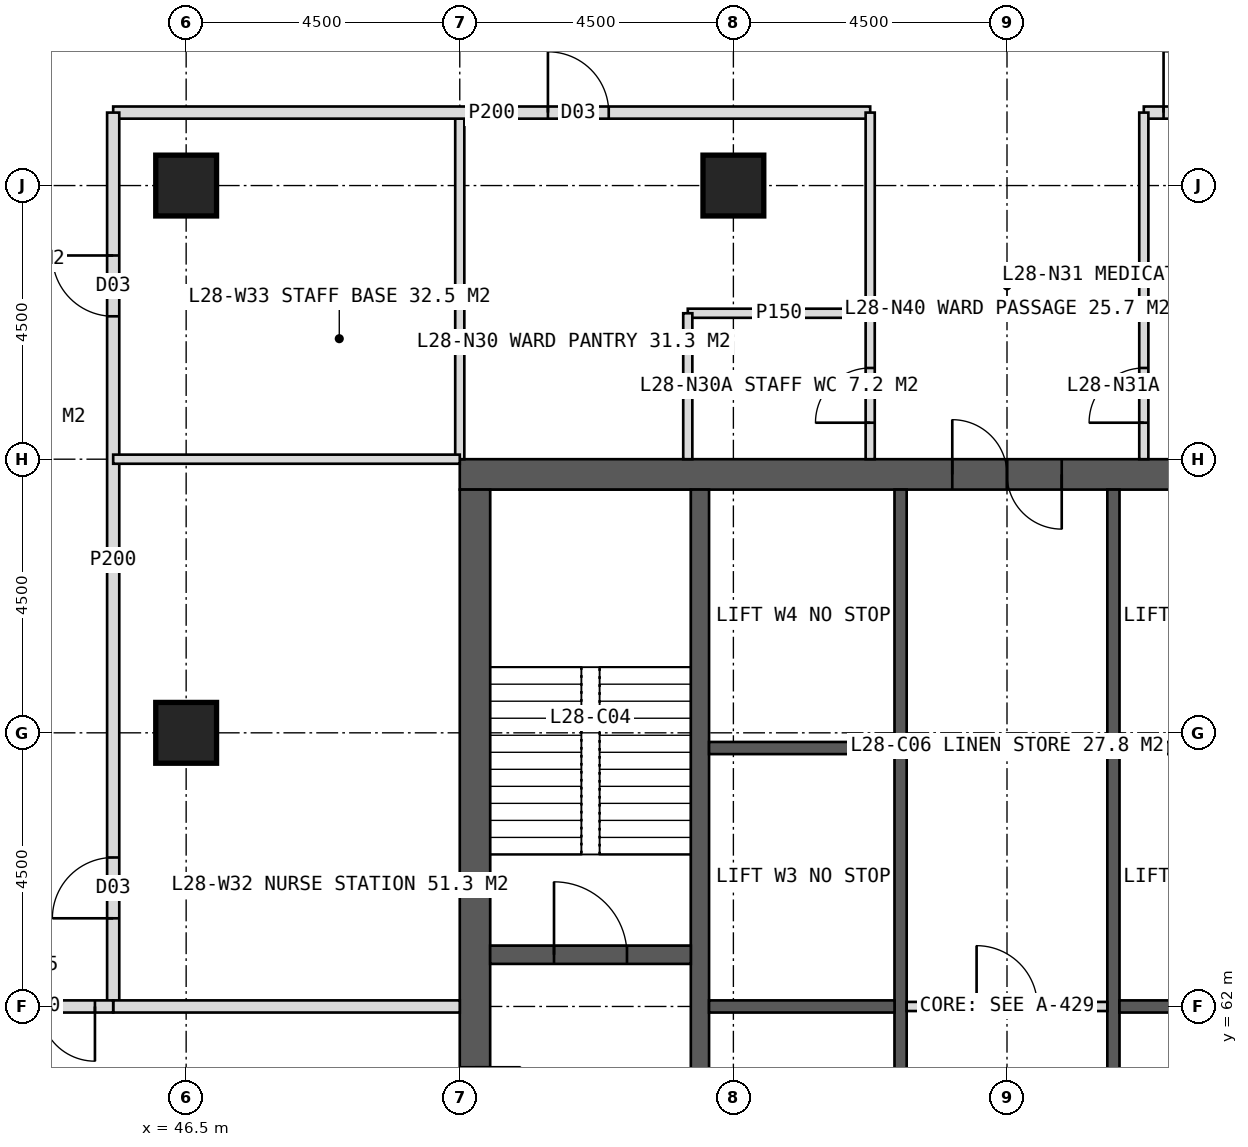
"""IFC4 building model, lengths in metres.
Left out: names, types, materials, properties, quantities, classifications, styles, units other than length and angle.
Written with IfcOpenShell. Run it as: python <this file> out.ifc"""

import sys

from ifc_helpers import new_model, si_unit, direction, frame, frame_2d, origin, origin_2d, place, context, subcontext, project, spatial, rectangle, hollow_rectangle, extrude, element, fill, save


model = new_model("IFC4")
c1 = context("Model", 3, precision=1e-05, world=origin(), true_north=direction((0.0, 1.0)))
c2 = subcontext(c1, "Body", "Model", "MODEL_VIEW")
j1 = project(units=[si_unit("LENGTHUNIT", "METRE"), si_unit("PLANEANGLEUNIT", "RADIAN")], contexts=[c1])
p1 = place(None, origin())
s1 = spatial("IfcSite", under=j1, at=p1, CompositionType="ELEMENT")
p2 = place(p1, origin())
s2 = spatial("IfcBuilding", under=s1, at=p2, CompositionType="ELEMENT")
p3 = place(p2, frame((0.0, 0.0, 120.0)))
s3 = spatial("IfcBuildingStorey", under=s2, at=p3, CompositionType="ELEMENT", Elevation=120.0)
p4 = place(p3, frame((51.0, 70.75, 0.0), z_axis=(0.0, 0.0, 1.0), x_axis=(1.0, 0.0, 0.0)))
e1 = element("IfcWall", 1, at=p4, inside=s3, PredefinedType="SHEAR", context=c2, shape_type="SweptSolid", body=[
    extrude(rectangle(XDim=18.0, YDim=0.5, at=frame_2d((9.0, 0.0))), origin(), (0.0, 0.0, 1.0), 4.0),
])
p5 = place(p4, frame((8.1, 0.0, 0.0)))
e2 = element("IfcOpeningElement", 2, at=p5, cuts=e1, PredefinedType="OPENING", context=c2, shape_type="SweptSolid", body=[
    extrude(rectangle(XDim=1.8, YDim=2.2, at=frame_2d((0.9, 1.1))), frame((0.0, 0.26, 0.0), z_axis=(0.0, -1.0, 0.0), x_axis=(1.0, 0.0, 0.0)), (0.0, 0.0, 1.0), 0.52),
])
p6 = place(p3, frame((51.25, 53.5, 0.0), z_axis=(0.0, 0.0, 1.0), x_axis=(0.0, 1.0, 0.0)))
e3 = element("IfcWall", 3, at=p6, inside=s3, PredefinedType="SHEAR", context=c2, shape_type="SweptSolid", body=[
    extrude(rectangle(XDim=17.0, YDim=0.5, at=frame_2d((8.5, 0.0))), origin(), (0.0, 0.0, 1.0), 4.0),
])
p7 = place(p6, frame((6.0, 0.0, 0.0)))
e4 = element("IfcOpeningElement", 4, at=p7, cuts=e3, PredefinedType="OPENING", context=c2, shape_type="SweptSolid", body=[
    extrude(rectangle(XDim=1.5, YDim=2.2, at=frame_2d((0.75, 1.1))), frame((0.0, 0.26, 0.0), z_axis=(0.0, -1.0, 0.0), x_axis=(1.0, 0.0, 0.0)), (0.0, 0.0, 1.0), 0.52),
])
p8 = place(p3, frame((54.95, 53.5, 0.0), z_axis=(0.0, 0.0, 1.0), x_axis=(0.0, 1.0, 0.0)))
e5 = element("IfcWall", 5, at=p8, inside=s3, PredefinedType="SHEAR", context=c2, shape_type="SweptSolid", body=[
    extrude(rectangle(XDim=17.0, YDim=0.3, at=frame_2d((8.5, 0.0))), origin(), (0.0, 0.0, 1.0), 4.0),
])
p9 = place(p3, frame((58.25, 53.5, 0.0), z_axis=(0.0, 0.0, 1.0), x_axis=(0.0, 1.0, 0.0)))
e6 = element("IfcWall", 6, at=p9, inside=s3, PredefinedType="SHEAR", context=c2, shape_type="SweptSolid", body=[
    extrude(rectangle(XDim=17.0, YDim=0.2, at=frame_2d((8.5, 0.0))), origin(), (0.0, 0.0, 1.0), 4.0),
])
p10 = place(p9, frame((1.375, 0.0, 0.0)))
e7 = element("IfcOpeningElement", 7, at=p10, cuts=e6, PredefinedType="OPENING", context=c2, shape_type="SweptSolid", body=[
    extrude(rectangle(XDim=1.4, YDim=2.2, at=frame_2d((0.7, 1.1))), frame((0.0, 0.11, 0.0), z_axis=(0.0, -1.0, 0.0), x_axis=(1.0, 0.0, 0.0)), (0.0, 0.0, 1.0), 0.22),
])
p11 = place(p9, frame((5.675, 0.0, 0.0)))
e8 = element("IfcOpeningElement", 8, at=p11, cuts=e6, PredefinedType="OPENING", context=c2, shape_type="SweptSolid", body=[
    extrude(rectangle(XDim=1.4, YDim=2.2, at=frame_2d((0.7, 1.1))), frame((0.0, 0.11, 0.0), z_axis=(0.0, -1.0, 0.0), x_axis=(1.0, 0.0, 0.0)), (0.0, 0.0, 1.0), 0.22),
])
p12 = place(p3, frame((61.75, 53.5, 0.0), z_axis=(0.0, 0.0, 1.0), x_axis=(0.0, 1.0, 0.0)))
e9 = element("IfcWall", 9, at=p12, inside=s3, PredefinedType="SHEAR", context=c2, shape_type="SweptSolid", body=[
    extrude(rectangle(XDim=17.0, YDim=0.2, at=frame_2d((8.5, 0.0))), origin(), (0.0, 0.0, 1.0), 4.0),
])
p13 = place(p12, frame((1.375, 0.0, 0.0)))
e10 = element("IfcOpeningElement", 10, at=p13, cuts=e9, PredefinedType="OPENING", context=c2, shape_type="SweptSolid", body=[
    extrude(rectangle(XDim=1.4, YDim=2.2, at=frame_2d((0.7, 1.1))), frame((0.0, 0.11, 0.0), z_axis=(0.0, -1.0, 0.0), x_axis=(1.0, 0.0, 0.0)), (0.0, 0.0, 1.0), 0.22),
])
p14 = place(p12, frame((5.675, 0.0, 0.0)))
e11 = element("IfcOpeningElement", 11, at=p14, cuts=e9, PredefinedType="OPENING", context=c2, shape_type="SweptSolid", body=[
    extrude(rectangle(XDim=1.4, YDim=2.2, at=frame_2d((0.7, 1.1))), frame((0.0, 0.11, 0.0), z_axis=(0.0, -1.0, 0.0), x_axis=(1.0, 0.0, 0.0)), (0.0, 0.0, 1.0), 0.22),
])
for number, where, z_axis, x_axis in (
    (12, (55.1, 62.0, 0.0), (0.0, 0.0, 1.0), (1.0, 0.0, 0.0)),
    (13, (61.85, 62.0, 0.0), (0.0, 0.0, 1.0), (1.0, 0.0, 0.0)),
    (14, (55.1, 66.25, 0.0), (0.0, 0.0, 1.0), (1.0, 0.0, 0.0)),
    (15, (61.85, 66.25, 0.0), (0.0, 0.0, 1.0), (1.0, 0.0, 0.0)),
):
    element("IfcWall", number, at=place(p3, frame(where, z_axis=z_axis, x_axis=x_axis)), inside=s3, PredefinedType="SHEAR", context=c2, shape_type="SweptSolid", body=[
        extrude(rectangle(XDim=3.05, YDim=0.2, at=frame_2d((1.525, 0.0))), origin(), (0.0, 0.0, 1.0), 4.0),
    ])
p15 = place(p3, frame((51.5, 62.85, 0.0), z_axis=(0.0, 0.0, 1.0), x_axis=(1.0, 0.0, 0.0)))
e16 = element("IfcWall", 16, at=p15, inside=s3, PredefinedType="SHEAR", context=c2, shape_type="SweptSolid", body=[
    extrude(rectangle(XDim=3.3, YDim=0.3, at=frame_2d((1.65, 0.0))), origin(), (0.0, 0.0, 1.0), 4.0),
])
p16 = place(p15, frame((1.05, 0.0, 0.0)))
e17 = element("IfcOpeningElement", 17, at=p16, cuts=e16, PredefinedType="OPENING", context=c2, shape_type="SweptSolid", body=[
    extrude(rectangle(XDim=1.2, YDim=2.1, at=frame_2d((0.6, 1.05))), frame((0.0, 0.16, 0.0), z_axis=(0.0, -1.0, 0.0), x_axis=(1.0, 0.0, 0.0)), (0.0, 0.0, 1.0), 0.32),
])
for number, where, z_axis, x_axis in (
    (18, (46.5, 75.5, 0.0), (0.0, 0.0, 1.0), (1.0, 0.0, 0.0)),
    (19, (55.5, 75.5, 0.0), (0.0, 0.0, 1.0), (1.0, 0.0, 0.0)),
    (20, (46.5, 66.5, 0.0), (0.0, 0.0, 1.0), (1.0, 0.0, 0.0)),
):
    element("IfcColumn", number, at=place(p3, frame(where, z_axis=z_axis, x_axis=x_axis)), inside=s3, PredefinedType="COLUMN", context=c2, shape_type="SweptSolid", body=[
        extrude(hollow_rectangle(XDim=1.0, YDim=1.0, WallThickness=0.1, at=origin_2d()), origin(), (0.0, 0.0, 1.0), 4.0),
    ])
p17 = place(p3, frame((51.0, 71.0, 0.0), z_axis=(0.0, 0.0, 1.0), x_axis=(0.0, 1.0, 0.0)))
e21 = element("IfcWall", 21, at=p17, inside=s3, PredefinedType="PARTITIONING", context=c2, shape_type="SweptSolid", body=[
    extrude(rectangle(XDim=5.7, YDim=0.15, at=frame_2d((2.85, 0.0))), origin(), (0.0, 0.0, 1.0), 3.75),
])
p18 = place(p3, frame((45.3, 76.7, 0.0), z_axis=(0.0, 0.0, 1.0), x_axis=(1.0, 0.0, 0.0)))
e22 = element("IfcWall", 22, at=p18, inside=s3, PredefinedType="PARTITIONING", context=c2, shape_type="SweptSolid", body=[
    extrude(rectangle(XDim=12.45, YDim=0.2, at=frame_2d((6.225, 0.0))), origin(), (0.0, 0.0, 1.0), 3.75),
])
p19 = place(p18, frame((7.15, 0.0, 0.0)))
e23 = element("IfcOpeningElement", 23, at=p19, cuts=e22, PredefinedType="OPENING", context=c2, shape_type="SweptSolid", body=[
    extrude(rectangle(XDim=1.0, YDim=2.1, at=frame_2d((0.5, 1.05))), frame((0.0, 0.11, 0.0), z_axis=(0.0, -1.0, 0.0), x_axis=(1.0, 0.0, 0.0)), (0.0, 0.0, 1.0), 0.22),
])
p20 = place(p3, frame((62.25, 76.7, 0.0), z_axis=(0.0, 0.0, 1.0), x_axis=(1.0, 0.0, 0.0)))
e24 = element("IfcWall", 24, at=p20, inside=s3, PredefinedType="PARTITIONING", context=c2, shape_type="SweptSolid", body=[
    extrude(rectangle(XDim=6.75, YDim=0.2, at=frame_2d((3.375, 0.0))), origin(), (0.0, 0.0, 1.0), 3.75),
])
p21 = place(p20, frame((0.325, 0.0, 0.0)))
e25 = element("IfcOpeningElement", 25, at=p21, cuts=e24, PredefinedType="OPENING", context=c2, shape_type="SweptSolid", body=[
    extrude(rectangle(XDim=1.0, YDim=2.1, at=frame_2d((0.5, 1.05))), frame((0.0, 0.11, 0.0), z_axis=(0.0, -1.0, 0.0), x_axis=(1.0, 0.0, 0.0)), (0.0, 0.0, 1.0), 0.22),
])
p22 = place(p20, frame((5.5, 0.0, 0.0)))
e26 = element("IfcOpeningElement", 26, at=p22, cuts=e24, PredefinedType="OPENING", context=c2, shape_type="SweptSolid", body=[
    extrude(rectangle(XDim=1.0, YDim=2.1, at=frame_2d((0.5, 1.05))), frame((0.0, 0.11, 0.0), z_axis=(0.0, -1.0, 0.0), x_axis=(1.0, 0.0, 0.0)), (0.0, 0.0, 1.0), 0.22),
])
p23 = place(p3, frame((57.75, 71.0, 0.0), z_axis=(0.0, 0.0, 1.0), x_axis=(0.0, 1.0, 0.0)))
e27 = element("IfcWall", 27, at=p23, inside=s3, PredefinedType="PARTITIONING", context=c2, shape_type="SweptSolid", body=[
    extrude(rectangle(XDim=5.7, YDim=0.15, at=frame_2d((2.85, 0.0))), origin(), (0.0, 0.0, 1.0), 3.75),
])
p24 = place(p23, frame((0.6, 0.0, 0.0)))
e28 = element("IfcOpeningElement", 28, at=p24, cuts=e27, PredefinedType="OPENING", context=c2, shape_type="SweptSolid", body=[
    extrude(rectangle(XDim=0.9, YDim=2.1, at=frame_2d((0.45, 1.05))), frame((0.0, 0.085, 0.0), z_axis=(0.0, -1.0, 0.0), x_axis=(1.0, 0.0, 0.0)), (0.0, 0.0, 1.0), 0.17),
])
p25 = place(p3, frame((62.25, 71.0, 0.0), z_axis=(0.0, 0.0, 1.0), x_axis=(0.0, 1.0, 0.0)))
e29 = element("IfcWall", 29, at=p25, inside=s3, PredefinedType="PARTITIONING", context=c2, shape_type="SweptSolid", body=[
    extrude(rectangle(XDim=5.7, YDim=0.15, at=frame_2d((2.85, 0.0))), origin(), (0.0, 0.0, 1.0), 3.75),
])
p26 = place(p25, frame((0.6, 0.0, 0.0)))
e30 = element("IfcOpeningElement", 30, at=p26, cuts=e29, PredefinedType="OPENING", context=c2, shape_type="SweptSolid", body=[
    extrude(rectangle(XDim=0.9, YDim=2.1, at=frame_2d((0.45, 1.05))), frame((0.0, 0.085, 0.0), z_axis=(0.0, -1.0, 0.0), x_axis=(1.0, 0.0, 0.0)), (0.0, 0.0, 1.0), 0.17),
])
p27 = place(p3, frame((54.75, 73.4, 0.0), z_axis=(0.0, 0.0, 1.0), x_axis=(1.0, 0.0, 0.0)))
e31 = element("IfcWall", 31, at=p27, inside=s3, PredefinedType="PARTITIONING", context=c2, shape_type="SweptSolid", body=[
    extrude(rectangle(XDim=3.0, YDim=0.15, at=frame_2d((1.5, 0.0))), origin(), (0.0, 0.0, 1.0), 3.75),
])
p28 = place(p3, frame((54.75, 71.0, 0.0), z_axis=(0.0, 0.0, 1.0), x_axis=(0.0, 1.0, 0.0)))
e32 = element("IfcWall", 32, at=p28, inside=s3, PredefinedType="PARTITIONING", context=c2, shape_type="SweptSolid", body=[
    extrude(rectangle(XDim=2.4, YDim=0.15, at=frame_2d((1.2, 0.0))), origin(), (0.0, 0.0, 1.0), 3.75),
])
p29 = place(p3, frame((62.25, 73.4, 0.0), z_axis=(0.0, 0.0, 1.0), x_axis=(1.0, 0.0, 0.0)))
e33 = element("IfcWall", 33, at=p29, inside=s3, PredefinedType="PARTITIONING", context=c2, shape_type="SweptSolid", body=[
    extrude(rectangle(XDim=3.0, YDim=0.15, at=frame_2d((1.5, 0.0))), origin(), (0.0, 0.0, 1.0), 3.75),
])
p30 = place(p3, frame((45.3, 62.0, 0.0), z_axis=(0.0, 0.0, 1.0), x_axis=(0.0, 1.0, 0.0)))
e34 = element("IfcWall", 34, at=p30, inside=s3, PredefinedType="PARTITIONING", context=c2, shape_type="SweptSolid", body=[
    extrude(rectangle(XDim=14.7, YDim=0.2, at=frame_2d((7.35, 0.0))), origin(), (0.0, 0.0, 1.0), 3.75),
])
p31 = place(p30, frame((1.45, 0.0, 0.0)))
e35 = element("IfcOpeningElement", 35, at=p31, cuts=e34, PredefinedType="OPENING", context=c2, shape_type="SweptSolid", body=[
    extrude(rectangle(XDim=1.0, YDim=2.1, at=frame_2d((0.5, 1.05))), frame((0.0, 0.11, 0.0), z_axis=(0.0, -1.0, 0.0), x_axis=(1.0, 0.0, 0.0)), (0.0, 0.0, 1.0), 0.22),
])
p32 = place(p30, frame((11.35, 0.0, 0.0)))
e36 = element("IfcOpeningElement", 36, at=p32, cuts=e34, PredefinedType="OPENING", context=c2, shape_type="SweptSolid", body=[
    extrude(rectangle(XDim=1.0, YDim=2.1, at=frame_2d((0.5, 1.05))), frame((0.0, 0.11, 0.0), z_axis=(0.0, -1.0, 0.0), x_axis=(1.0, 0.0, 0.0)), (0.0, 0.0, 1.0), 0.22),
])
p33 = place(p3, frame((51.0, 62.0, 0.0), z_axis=(0.0, 0.0, 1.0), x_axis=(-1.0, 0.0, 0.0)))
e37 = element("IfcWall", 37, at=p33, inside=s3, PredefinedType="SOLIDWALL", context=c2, shape_type="SweptSolid", body=[
    extrude(rectangle(XDim=5.7, YDim=0.2, at=frame_2d((2.85, 0.0))), origin(), (0.0, 0.0, 1.0), 2.95),
])
p34 = place(p3, frame((51.0, 71.0, 0.0), z_axis=(0.0, 0.0, 1.0), x_axis=(-1.0, 0.0, 0.0)))
e38 = element("IfcWall", 38, at=p34, inside=s3, PredefinedType="PARTITIONING", context=c2, shape_type="SweptSolid", body=[
    extrude(rectangle(XDim=5.7, YDim=0.15, at=frame_2d((2.85, 0.0))), origin(), (0.0, 0.0, 1.0), 3.75),
])
p35 = place(p3, frame((45.3, 62.0, 0.0), z_axis=(0.0, 0.0, 1.0), x_axis=(-1.0, 0.0, 0.0)))
e39 = element("IfcWall", 39, at=p35, inside=s3, PredefinedType="SOLIDWALL", context=c2, shape_type="SweptSolid", body=[
    extrude(rectangle(XDim=2.7, YDim=0.2, at=frame_2d((1.35, 0.0))), origin(), (0.0, 0.0, 1.0), 2.95),
])
p36 = place(p35, frame((0.3, 0.0, 0.0)))
e40 = element("IfcOpeningElement", 40, at=p36, cuts=e39, PredefinedType="OPENING", context=c2, shape_type="SweptSolid", body=[
    extrude(rectangle(XDim=1.8, YDim=2.2, at=frame_2d((0.9, 1.1))), frame((0.0, 0.11, 0.0), z_axis=(0.0, -1.0, 0.0), x_axis=(1.0, 0.0, 0.0)), (0.0, 0.0, 1.0), 0.22),
])
p37 = place(p3, frame((58.35, 62.0, 0.0), z_axis=(0.0, 0.0, 1.0), x_axis=(1.0, 0.0, 0.0)))
e41 = element("IfcWall", 41, at=p37, inside=s3, PredefinedType="PARTITIONING", context=c2, shape_type="SweptSolid", body=[
    extrude(rectangle(XDim=3.3, YDim=0.15, at=frame_2d((1.65, 0.0))), origin(), (0.0, 0.0, 1.0), 3.75),
])
p38 = place(p37, frame((1.15, 0.0, 0.0)))
e42 = element("IfcOpeningElement", 42, at=p38, cuts=e41, PredefinedType="OPENING", context=c2, shape_type="SweptSolid", body=[
    extrude(rectangle(XDim=1.0, YDim=2.1, at=frame_2d((0.5, 1.05))), frame((0.0, 0.085, 0.0), z_axis=(0.0, -1.0, 0.0), x_axis=(1.0, 0.0, 0.0)), (0.0, 0.0, 1.0), 0.17),
])
p39 = place(p24, origin())
e43 = element("IfcDoor", 43, at=p39, inside=s3, OperationType="SINGLE_SWING_LEFT", PredefinedType="DOOR", context=c2, shape_type="SweptSolid", body=[
    extrude(rectangle(XDim=0.9, YDim=2.1, at=frame_2d((0.45, 1.05))), frame((0.0, 0.025, 0.0), z_axis=(0.0, -1.0, 0.0), x_axis=(1.0, 0.0, 0.0)), (0.0, 0.0, 1.0), 0.05),
])
fill(e28, e43)
p40 = place(p19, origin())
e44 = element("IfcDoor", 44, at=p40, inside=s3, OperationType="SINGLE_SWING_LEFT", PredefinedType="DOOR", context=c2, shape_type="SweptSolid", body=[
    extrude(rectangle(XDim=1.0, YDim=2.1, at=frame_2d((0.5, 1.05))), frame((0.0, 0.025, 0.0), z_axis=(0.0, -1.0, 0.0), x_axis=(1.0, 0.0, 0.0)), (0.0, 0.0, 1.0), 0.05),
])
fill(e23, e44)
p41 = place(p26, origin())
e45 = element("IfcDoor", 45, at=p41, inside=s3, OperationType="SINGLE_SWING_LEFT", PredefinedType="DOOR", context=c2, shape_type="SweptSolid", body=[
    extrude(rectangle(XDim=0.9, YDim=2.1, at=frame_2d((0.45, 1.05))), frame((0.0, 0.025, 0.0), z_axis=(0.0, -1.0, 0.0), x_axis=(1.0, 0.0, 0.0)), (0.0, 0.0, 1.0), 0.05),
])
fill(e30, e45)
p42 = place(p21, origin())
e46 = element("IfcDoor", 46, at=p42, inside=s3, OperationType="SINGLE_SWING_LEFT", PredefinedType="DOOR", context=c2, shape_type="SweptSolid", body=[
    extrude(rectangle(XDim=1.0, YDim=2.1, at=frame_2d((0.5, 1.05))), frame((0.0, 0.025, 0.0), z_axis=(0.0, -1.0, 0.0), x_axis=(1.0, 0.0, 0.0)), (0.0, 0.0, 1.0), 0.05),
])
fill(e25, e46)
p43 = place(p31, origin())
e47 = element("IfcDoor", 47, at=p43, inside=s3, OperationType="SINGLE_SWING_LEFT", PredefinedType="DOOR", context=c2, shape_type="SweptSolid", body=[
    extrude(rectangle(XDim=1.0, YDim=2.1, at=frame_2d((0.5, 1.05))), frame((0.0, 0.025, 0.0), z_axis=(0.0, -1.0, 0.0), x_axis=(1.0, 0.0, 0.0)), (0.0, 0.0, 1.0), 0.05),
])
fill(e35, e47)
p44 = place(p32, origin())
e48 = element("IfcDoor", 48, at=p44, inside=s3, OperationType="SINGLE_SWING_RIGHT", PredefinedType="DOOR", context=c2, shape_type="SweptSolid", body=[
    extrude(rectangle(XDim=1.0, YDim=2.1, at=frame_2d((0.5, 1.05))), frame((0.0, 0.025, 0.0), z_axis=(0.0, -1.0, 0.0), x_axis=(1.0, 0.0, 0.0)), (0.0, 0.0, 1.0), 0.05),
])
fill(e36, e48)
p45 = place(p36, origin())
e49 = element("IfcDoor", 49, at=p45, inside=s3, OperationType="DOUBLE_DOOR_DOUBLE_SWING", PredefinedType="DOOR", context=c2, shape_type="SweptSolid", body=[
    extrude(rectangle(XDim=1.8, YDim=2.2, at=frame_2d((0.9, 1.1))), frame((0.0, 0.025, 0.0), z_axis=(0.0, -1.0, 0.0), x_axis=(1.0, 0.0, 0.0)), (0.0, 0.0, 1.0), 0.05),
])
fill(e40, e49)
p46 = place(p16, origin())
e50 = element("IfcDoor", 50, at=p46, inside=s3, OperationType="SINGLE_SWING_LEFT", PredefinedType="DOOR", context=c2, shape_type="SweptSolid", body=[
    extrude(rectangle(XDim=1.2, YDim=2.1, at=frame_2d((0.6, 1.05))), frame((0.0, 0.025, 0.0), z_axis=(0.0, -1.0, 0.0), x_axis=(1.0, 0.0, 0.0)), (0.0, 0.0, 1.0), 0.05),
])
fill(e17, e50)
p47 = place(p38, origin())
e51 = element("IfcDoor", 51, at=p47, inside=s3, OperationType="SINGLE_SWING_LEFT", PredefinedType="DOOR", context=c2, shape_type="SweptSolid", body=[
    extrude(rectangle(XDim=1.0, YDim=2.1, at=frame_2d((0.5, 1.05))), frame((0.0, 0.025, 0.0), z_axis=(0.0, -1.0, 0.0), x_axis=(1.0, 0.0, 0.0)), (0.0, 0.0, 1.0), 0.05),
])
fill(e42, e51)
p48 = place(p5, origin())
e52 = element("IfcDoor", 52, at=p48, inside=s3, OperationType="DOUBLE_DOOR_SINGLE_SWING", PredefinedType="DOOR", context=c2, shape_type="SweptSolid", body=[
    extrude(rectangle(XDim=1.8, YDim=2.2, at=frame_2d((0.9, 1.1))), frame((0.0, 0.025, 0.0), z_axis=(0.0, -1.0, 0.0), x_axis=(1.0, 0.0, 0.0)), (0.0, 0.0, 1.0), 0.05),
])
fill(e2, e52)
save(model, sys.argv[1])
